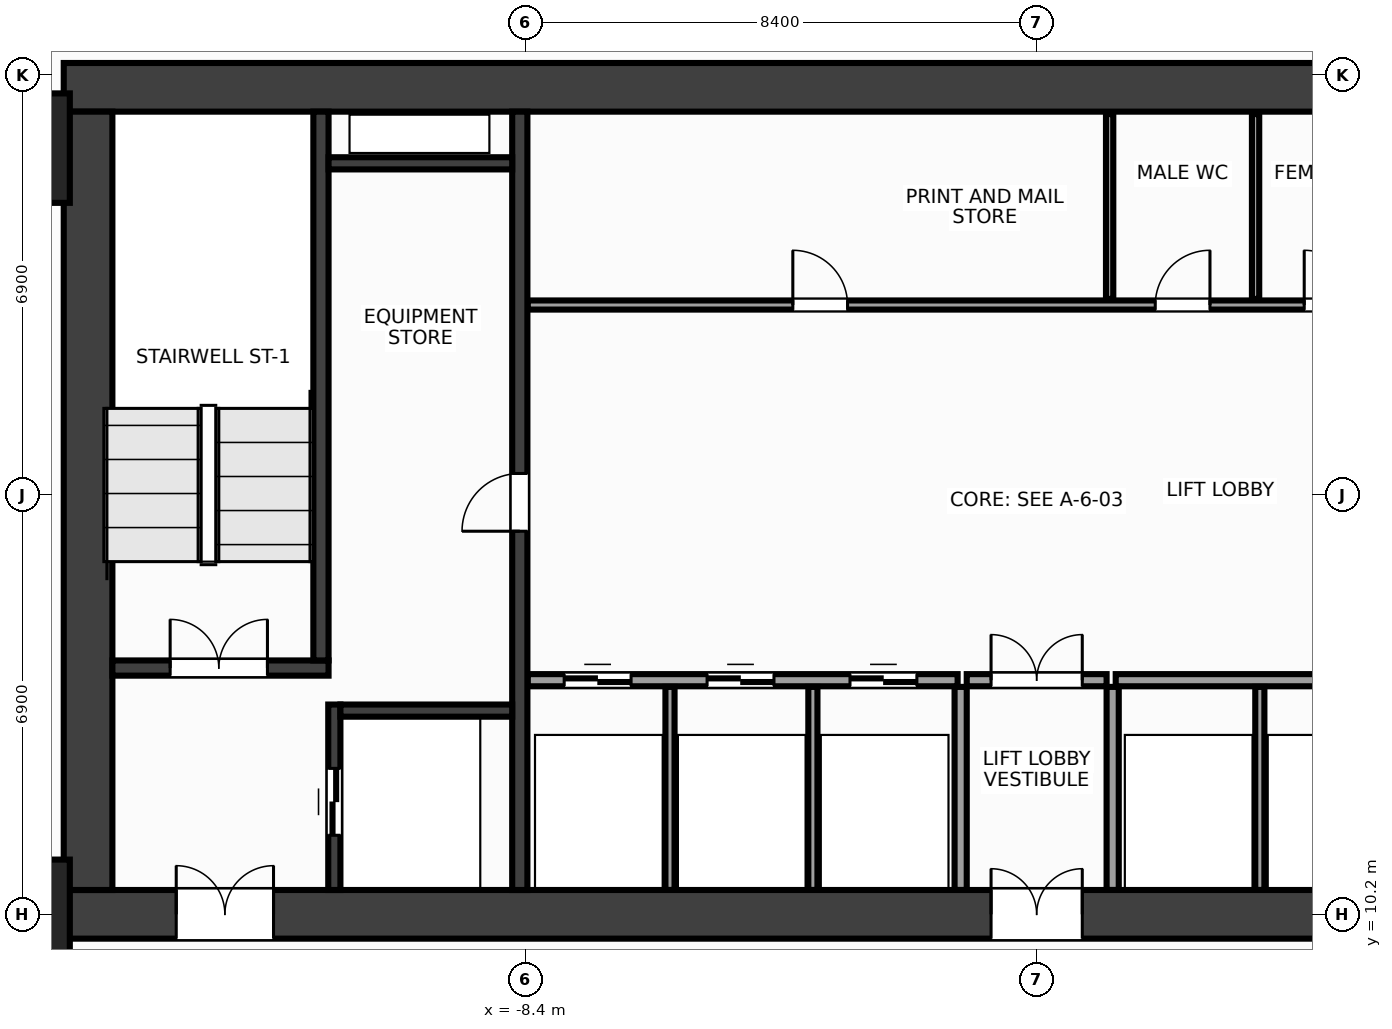
"""IFC4 building model, lengths in metres.
Left out: names, types, materials, properties, quantities, classifications, styles, units other than length and angle.
Written with IfcOpenShell. Run it as: python <this file> out.ifc"""

import sys

from ifc_helpers import new_model, si_unit, direction, frame, frame_2d, origin, origin_2d, place, context, subcontext, project, spatial, rectangle, extrude, source, transform, mapped, element, fill, save


model = new_model("IFC4")
c1 = context("Model", 3, precision=1e-05, world=origin(), true_north=direction((0.0, 1.0)))
c2 = subcontext(c1, "Body", "Model", "MODEL_VIEW")
j1 = project(units=[si_unit("LENGTHUNIT", "METRE"), si_unit("PLANEANGLEUNIT", "RADIAN")], contexts=[c1])
p1 = place(None, origin())
s1 = spatial("IfcSite", under=j1, at=p1, CompositionType="ELEMENT")
p2 = place(p1, origin())
s2 = spatial("IfcBuilding", under=s1, at=p2, CompositionType="ELEMENT")
p3 = place(p2, frame((0.0, 0.0, 52.4)))
s3 = spatial("IfcBuildingStorey", under=s2, at=p3, CompositionType="ELEMENT", Elevation=52.4)
m1 = source(origin(), c2, "Body", "SweptSolid", [
    extrude(rectangle(XDim=32.0, YDim=0.8, at=frame_2d((16.0, 0.0))), origin(), (0.0, 0.0, 1.0), 3.6),
])
p4 = place(p3, frame((-16.0, 23.8, 0.0), z_axis=(0.0, 0.0, 1.0), x_axis=(1.0, 0.0, 0.0)))
e1 = element("IfcWall", 1, at=p4, inside=s3, PredefinedType="SHEAR", context=c2, shape_type="MappedRepresentation", body=[
    mapped(m1, transform((0.0, 0.0, 0.0), x_axis=(1.0, 0.0, 0.0), y_axis=(0.0, 1.0, 0.0), z_axis=(0.0, 0.0, 1.0), scale=1.0)),
])
p5 = place(p3, frame((-16.0, 10.2, 0.0), z_axis=(0.0, 0.0, 1.0), x_axis=(1.0, 0.0, 0.0)))
e2 = element("IfcWall", 2, at=p5, inside=s3, PredefinedType="SHEAR", context=c2, shape_type="MappedRepresentation", body=[
    mapped(m1, transform((0.0, 0.0, 0.0), x_axis=(1.0, 0.0, 0.0), y_axis=(0.0, 1.0, 0.0), z_axis=(0.0, 0.0, 1.0), scale=1.0)),
])
p6 = place(p5, frame((1.85, 0.0, 0.0)))
e3 = element("IfcOpeningElement", 3, at=p6, cuts=e2, PredefinedType="OPENING", context=c2, shape_type="SweptSolid", body=[
    extrude(rectangle(XDim=1.6, YDim=2.15, at=frame_2d((0.8, 1.075))), frame((0.0, 0.412, 0.0), z_axis=(0.0, -1.0, 0.0), x_axis=(1.0, 0.0, 0.0)), (0.0, 0.0, 1.0), 0.824),
])
p7 = place(p5, frame((28.55, 0.0, 0.0)))
e4 = element("IfcOpeningElement", 4, at=p7, cuts=e2, PredefinedType="OPENING", context=c2, shape_type="SweptSolid", body=[
    extrude(rectangle(XDim=1.6, YDim=2.15, at=frame_2d((0.8, 1.075))), frame((0.0, 0.412, 0.0), z_axis=(0.0, -1.0, 0.0), x_axis=(1.0, 0.0, 0.0)), (0.0, 0.0, 1.0), 0.824),
])
p8 = place(p5, frame((15.25, 0.0, 0.0)))
e5 = element("IfcOpeningElement", 5, at=p8, cuts=e2, PredefinedType="OPENING", context=c2, shape_type="SweptSolid", body=[
    extrude(rectangle(XDim=1.5, YDim=2.2, at=frame_2d((0.75, 1.1))), frame((0.0, 0.412, 0.0), z_axis=(0.0, -1.0, 0.0), x_axis=(1.0, 0.0, 0.0)), (0.0, 0.0, 1.0), 0.824),
])
m2 = source(origin(), c2, "Body", "SweptSolid", [
    extrude(rectangle(XDim=12.8, YDim=0.8, at=frame_2d((6.4, 0.0))), origin(), (0.0, 0.0, 1.0), 3.6),
])
p9 = place(p3, frame((-15.6, 10.6, 0.0), z_axis=(0.0, 0.0, 1.0), x_axis=(0.0, 1.0, 0.0)))
e6 = element("IfcWall", 6, at=p9, inside=s3, PredefinedType="SHEAR", context=c2, shape_type="MappedRepresentation", body=[
    mapped(m2, transform((0.0, 0.0, 0.0), x_axis=(1.0, 0.0, 0.0), y_axis=(0.0, 1.0, 0.0), z_axis=(0.0, 0.0, 1.0), scale=1.0)),
])
m3 = source(origin(), c2, "Body", "SweptSolid", [
    extrude(rectangle(XDim=12.8, YDim=0.25, at=frame_2d((6.4, 0.0))), origin(), (0.0, 0.0, 1.0), 3.6),
])
p10 = place(p3, frame((-8.5, 10.6, 0.0), z_axis=(0.0, 0.0, 1.0), x_axis=(0.0, 1.0, 0.0)))
e7 = element("IfcWall", 7, at=p10, inside=s3, PredefinedType="SHEAR", context=c2, shape_type="MappedRepresentation", body=[
    mapped(m3, transform((0.0, 0.0, 0.0), x_axis=(1.0, 0.0, 0.0), y_axis=(0.0, 1.0, 0.0), z_axis=(0.0, 0.0, 1.0), scale=1.0)),
])
p11 = place(p10, frame((5.9, 0.0, 0.0)))
e8 = element("IfcOpeningElement", 8, at=p11, cuts=e7, PredefinedType="OPENING", context=c2, shape_type="SweptSolid", body=[
    extrude(rectangle(XDim=0.95, YDim=2.15, at=frame_2d((0.475, 1.075))), frame((0.0, 0.137, 0.0), z_axis=(0.0, -1.0, 0.0), x_axis=(1.0, 0.0, 0.0)), (0.0, 0.0, 1.0), 0.274),
])
m4 = source(origin(), c2, "Body", "SweptSolid", [
    extrude(rectangle(XDim=3.555, YDim=0.25, at=frame_2d((1.777, 0.0))), origin(), (0.0, 0.0, 1.0), 3.6),
])
p12 = place(p3, frame((-15.2, 14.25, 0.0), z_axis=(0.0, 0.0, 1.0), x_axis=(1.0, 0.0, 0.0)))
e9 = element("IfcWall", 9, at=p12, inside=s3, PredefinedType="SHEAR", context=c2, shape_type="MappedRepresentation", body=[
    mapped(m4, transform((0.0, 0.0, 0.0), x_axis=(1.0, 0.0, 0.0), y_axis=(0.0, 1.0, 0.0), z_axis=(0.0, 0.0, 1.0), scale=1.0)),
])
p13 = place(p12, frame((0.95, 0.0, 0.0)))
e10 = element("IfcOpeningElement", 10, at=p13, cuts=e9, PredefinedType="OPENING", context=c2, shape_type="SweptSolid", body=[
    extrude(rectangle(XDim=1.6, YDim=2.15, at=frame_2d((0.8, 1.075))), frame((0.0, 0.137, 0.0), z_axis=(0.0, -1.0, 0.0), x_axis=(1.0, 0.0, 0.0)), (0.0, 0.0, 1.0), 0.274),
])
m5 = source(origin(), c2, "Body", "SweptSolid", [
    extrude(rectangle(XDim=9.025, YDim=0.25, at=frame_2d((4.512, 0.0))), origin(), (0.0, 0.0, 1.0), 3.6),
])
p14 = place(p3, frame((-11.77, 14.375, 0.0), z_axis=(0.0, 0.0, 1.0), x_axis=(0.0, 1.0, 0.0)))
e11 = element("IfcWall", 11, at=p14, inside=s3, PredefinedType="SHEAR", context=c2, shape_type="MappedRepresentation", body=[
    mapped(m5, transform((0.0, 0.0, 0.0), x_axis=(1.0, 0.0, 0.0), y_axis=(0.0, 1.0, 0.0), z_axis=(0.0, 0.0, 1.0), scale=1.0)),
])
m6 = source(origin(), c2, "Body", "SweptSolid", [
    extrude(rectangle(XDim=3.05, YDim=0.2, at=frame_2d((1.525, 0.0))), origin(), (0.0, 0.0, 1.0), 3.6),
])
p15 = place(p3, frame((-11.55, 10.6, 0.0), z_axis=(0.0, 0.0, 1.0), x_axis=(0.0, 1.0, 0.0)))
e12 = element("IfcWall", 12, at=p15, inside=s3, PredefinedType="SHEAR", context=c2, shape_type="MappedRepresentation", body=[
    mapped(m6, transform((0.0, 0.0, 0.0), x_axis=(1.0, 0.0, 0.0), y_axis=(0.0, 1.0, 0.0), z_axis=(0.0, 0.0, 1.0), scale=1.0)),
])
p16 = place(p15, frame((0.9, 0.0, 0.0)))
e13 = element("IfcOpeningElement", 13, at=p16, cuts=e12, PredefinedType="OPENING", context=c2, shape_type="SweptSolid", body=[
    extrude(rectangle(XDim=1.1, YDim=2.15, at=frame_2d((0.55, 1.075))), frame((0.0, 0.112, 0.0), z_axis=(0.0, -1.0, 0.0), x_axis=(1.0, 0.0, 0.0)), (0.0, 0.0, 1.0), 0.224),
])
m7 = source(origin(), c2, "Body", "SweptSolid", [
    extrude(rectangle(XDim=2.825, YDim=0.2, at=frame_2d((1.413, 0.0))), origin(), (0.0, 0.0, 1.0), 3.6),
])
p17 = place(p3, frame((-11.45, 13.55, 0.0), z_axis=(0.0, 0.0, 1.0), x_axis=(1.0, 0.0, 0.0)))
e14 = element("IfcWall", 14, at=p17, inside=s3, PredefinedType="SHEAR", context=c2, shape_type="MappedRepresentation", body=[
    mapped(m7, transform((0.0, 0.0, 0.0), x_axis=(1.0, 0.0, 0.0), y_axis=(0.0, 1.0, 0.0), z_axis=(0.0, 0.0, 1.0), scale=1.0)),
])
m8 = source(origin(), c2, "Body", "SweptSolid", [
    extrude(rectangle(XDim=3.02, YDim=0.2, at=frame_2d((1.51, 0.0))), origin(), (0.0, 0.0, 1.0), 3.6),
])
p18 = place(p3, frame((-11.645, 22.55, 0.0), z_axis=(0.0, 0.0, 1.0), x_axis=(1.0, 0.0, 0.0)))
e15 = element("IfcWall", 15, at=p18, inside=s3, PredefinedType="SHEAR", context=c2, shape_type="MappedRepresentation", body=[
    mapped(m8, transform((0.0, 0.0, 0.0), x_axis=(1.0, 0.0, 0.0), y_axis=(0.0, 1.0, 0.0), z_axis=(0.0, 0.0, 1.0), scale=1.0)),
])
m9 = source(origin(), c2, "Body", "SweptSolid", [
    extrude(rectangle(XDim=1.8, YDim=1.8, at=origin_2d()), origin(), (0.0, 0.0, 1.0), 3.6),
])
for number, where, z_axis, x_axis in (
    (16, (-16.8, 10.2, 0.0), (0.0, 0.0, 1.0), (1.0, 0.0, 0.0)),
    (17, (-16.8, 22.8, 0.0), (0.0, 0.0, 1.0), (1.0, 0.0, 0.0)),
):
    element("IfcColumn", number, at=place(p3, frame(where, z_axis=z_axis, x_axis=x_axis)), inside=s3, PredefinedType="COLUMN", context=c2, shape_type="MappedRepresentation", body=[
        mapped(m9, transform((0.0, 0.0, 0.0), x_axis=(1.0, 0.0, 0.0), y_axis=(0.0, 1.0, 0.0), z_axis=(0.0, 0.0, 1.0), scale=1.0)),
    ])
m10 = source(origin(), c2, "Body", "SweptSolid", [
    extrude(rectangle(XDim=7.07, YDim=0.2, at=frame_2d((3.535, 0.0))), origin(), (0.0, 0.0, 1.0), 3.36),
])
p19 = place(p3, frame((-8.37, 14.05, 0.0), z_axis=(0.0, 0.0, 1.0), x_axis=(1.0, 0.0, 0.0)))
e18 = element("IfcWall", 18, at=p19, inside=s3, PredefinedType="PARTITIONING", context=c2, shape_type="MappedRepresentation", body=[
    mapped(m10, transform((0.0, 0.0, 0.0), x_axis=(1.0, 0.0, 0.0), y_axis=(0.0, 1.0, 0.0), z_axis=(0.0, 0.0, 1.0), scale=1.0)),
])
p20 = place(p19, frame((0.6, 0.0, 0.0)))
e19 = element("IfcOpeningElement", 19, at=p20, cuts=e18, PredefinedType="OPENING", context=c2, shape_type="SweptSolid", body=[
    extrude(rectangle(XDim=1.1, YDim=2.15, at=frame_2d((0.55, 1.075))), frame((0.0, 0.112, 0.0), z_axis=(0.0, -1.0, 0.0), x_axis=(1.0, 0.0, 0.0)), (0.0, 0.0, 1.0), 0.224),
])
p21 = place(p19, frame((2.95, 0.0, 0.0)))
e20 = element("IfcOpeningElement", 20, at=p21, cuts=e18, PredefinedType="OPENING", context=c2, shape_type="SweptSolid", body=[
    extrude(rectangle(XDim=1.1, YDim=2.15, at=frame_2d((0.55, 1.075))), frame((0.0, 0.112, 0.0), z_axis=(0.0, -1.0, 0.0), x_axis=(1.0, 0.0, 0.0)), (0.0, 0.0, 1.0), 0.224),
])
p22 = place(p19, frame((5.3, 0.0, 0.0)))
e21 = element("IfcOpeningElement", 21, at=p22, cuts=e18, PredefinedType="OPENING", context=c2, shape_type="SweptSolid", body=[
    extrude(rectangle(XDim=1.1, YDim=2.15, at=frame_2d((0.55, 1.075))), frame((0.0, 0.112, 0.0), z_axis=(0.0, -1.0, 0.0), x_axis=(1.0, 0.0, 0.0)), (0.0, 0.0, 1.0), 0.224),
])
p23 = place(p3, frame((1.3, 14.05, 0.0), z_axis=(0.0, 0.0, 1.0), x_axis=(1.0, 0.0, 0.0)))
e22 = element("IfcWall", 22, at=p23, inside=s3, PredefinedType="PARTITIONING", context=c2, shape_type="MappedRepresentation", body=[
    mapped(m10, transform((0.0, 0.0, 0.0), x_axis=(1.0, 0.0, 0.0), y_axis=(0.0, 1.0, 0.0), z_axis=(0.0, 0.0, 1.0), scale=1.0)),
])
m11 = source(origin(), c2, "Body", "SweptSolid", [
    extrude(rectangle(XDim=3.34, YDim=0.2, at=frame_2d((1.67, 0.0))), origin(), (0.0, 0.0, 1.0), 3.36),
])
for number, where, z_axis, x_axis in (
    (23, (-1.25, 10.6, 0.0), (0.0, 0.0, 1.0), (0.0, 1.0, 0.0)),
    (24, (1.25, 10.6, 0.0), (0.0, 0.0, 1.0), (0.0, 1.0, 0.0)),
):
    element("IfcWall", number, at=place(p3, frame(where, z_axis=z_axis, x_axis=x_axis)), inside=s3, PredefinedType="PARTITIONING", context=c2, shape_type="MappedRepresentation", body=[
        mapped(m11, transform((0.0, 0.0, 0.0), x_axis=(1.0, 0.0, 0.0), y_axis=(0.0, 1.0, 0.0), z_axis=(0.0, 0.0, 1.0), scale=1.0)),
    ])
m12 = source(origin(), c2, "Body", "SweptSolid", [
    extrude(rectangle(XDim=2.3, YDim=0.2, at=frame_2d((1.15, 0.0))), origin(), (0.0, 0.0, 1.0), 3.36),
])
p24 = place(p3, frame((-1.15, 14.05, 0.0), z_axis=(0.0, 0.0, 1.0), x_axis=(1.0, 0.0, 0.0)))
e25 = element("IfcWall", 25, at=p24, inside=s3, PredefinedType="PARTITIONING", context=c2, shape_type="MappedRepresentation", body=[
    mapped(m12, transform((0.0, 0.0, 0.0), x_axis=(1.0, 0.0, 0.0), y_axis=(0.0, 1.0, 0.0), z_axis=(0.0, 0.0, 1.0), scale=1.0)),
])
p25 = place(p24, frame((0.4, 0.0, 0.0)))
e26 = element("IfcOpeningElement", 26, at=p25, cuts=e25, PredefinedType="OPENING", context=c2, shape_type="SweptSolid", body=[
    extrude(rectangle(XDim=1.5, YDim=2.2, at=frame_2d((0.75, 1.1))), frame((0.0, 0.112, 0.0), z_axis=(0.0, -1.0, 0.0), x_axis=(1.0, 0.0, 0.0)), (0.0, 0.0, 1.0), 0.224),
])
m13 = source(origin(), c2, "Body", "SweptSolid", [
    extrude(rectangle(XDim=14.59, YDim=0.15, at=frame_2d((7.295, 0.0))), origin(), (0.0, 0.0, 1.0), 3.36),
])
p26 = place(p3, frame((-8.37, 20.22, 0.0), z_axis=(0.0, 0.0, 1.0), x_axis=(1.0, 0.0, 0.0)))
e27 = element("IfcWall", 27, at=p26, inside=s3, PredefinedType="PARTITIONING", context=c2, shape_type="MappedRepresentation", body=[
    mapped(m13, transform((0.0, 0.0, 0.0), x_axis=(1.0, 0.0, 0.0), y_axis=(0.0, 1.0, 0.0), z_axis=(0.0, 0.0, 1.0), scale=1.0)),
])
p27 = place(p26, frame((4.36, 0.0, 0.0)))
e28 = element("IfcOpeningElement", 28, at=p27, cuts=e27, PredefinedType="OPENING", context=c2, shape_type="SweptSolid", body=[
    extrude(rectangle(XDim=0.9, YDim=2.15, at=frame_2d((0.45, 1.075))), frame((0.0, 0.087, 0.0), z_axis=(0.0, -1.0, 0.0), x_axis=(1.0, 0.0, 0.0)), (0.0, 0.0, 1.0), 0.174),
])
p28 = place(p26, frame((10.32, 0.0, 0.0)))
e29 = element("IfcOpeningElement", 29, at=p28, cuts=e27, PredefinedType="OPENING", context=c2, shape_type="SweptSolid", body=[
    extrude(rectangle(XDim=0.9, YDim=2.15, at=frame_2d((0.45, 1.075))), frame((0.0, 0.087, 0.0), z_axis=(0.0, -1.0, 0.0), x_axis=(1.0, 0.0, 0.0)), (0.0, 0.0, 1.0), 0.174),
])
p29 = place(p26, frame((12.77, 0.0, 0.0)))
e30 = element("IfcOpeningElement", 30, at=p29, cuts=e27, PredefinedType="OPENING", context=c2, shape_type="SweptSolid", body=[
    extrude(rectangle(XDim=0.9, YDim=2.15, at=frame_2d((0.45, 1.075))), frame((0.0, 0.087, 0.0), z_axis=(0.0, -1.0, 0.0), x_axis=(1.0, 0.0, 0.0)), (0.0, 0.0, 1.0), 0.174),
])
m14 = source(origin(), c2, "Body", "SweptSolid", [
    extrude(rectangle(XDim=3.34, YDim=0.15, at=frame_2d((1.67, 0.0))), origin(), (0.0, 0.0, 1.0), 3.36),
])
for number, where, z_axis, x_axis in (
    (31, (-6.03, 10.6, 0.0), (0.0, 0.0, 1.0), (0.0, 1.0, 0.0)),
    (32, (-3.68, 10.6, 0.0), (0.0, 0.0, 1.0), (0.0, 1.0, 0.0)),
    (33, (3.67, 10.6, 0.0), (0.0, 0.0, 1.0), (0.0, 1.0, 0.0)),
):
    element("IfcWall", number, at=place(p3, frame(where, z_axis=z_axis, x_axis=x_axis)), inside=s3, PredefinedType="PARTITIONING", context=c2, shape_type="MappedRepresentation", body=[
        mapped(m14, transform((0.0, 0.0, 0.0), x_axis=(1.0, 0.0, 0.0), y_axis=(0.0, 1.0, 0.0), z_axis=(0.0, 0.0, 1.0), scale=1.0)),
    ])
m15 = source(origin(), c2, "Body", "SweptSolid", [
    extrude(rectangle(XDim=3.04, YDim=0.12, at=frame_2d((1.52, 0.0))), origin(), (0.0, 0.0, 1.0), 3.36),
])
for number, where, z_axis, x_axis in (
    (34, (1.2, 20.32, 0.0), (0.0, 0.0, 1.0), (0.0, 1.0, 0.0)),
    (35, (3.6, 20.32, 0.0), (0.0, 0.0, 1.0), (0.0, 1.0, 0.0)),
):
    element("IfcWall", number, at=place(p3, frame(where, z_axis=z_axis, x_axis=x_axis)), inside=s3, PredefinedType="PARTITIONING", context=c2, shape_type="MappedRepresentation", body=[
        mapped(m15, transform((0.0, 0.0, 0.0), x_axis=(1.0, 0.0, 0.0), y_axis=(0.0, 1.0, 0.0), z_axis=(0.0, 0.0, 1.0), scale=1.0)),
    ])
m16 = source(origin(), c2, "Body", "SweptSolid", [
    extrude(rectangle(XDim=1.6, YDim=2.15, at=frame_2d((0.8, 1.075))), frame((0.0, 0.025, 0.0), z_axis=(0.0, -1.0, 0.0), x_axis=(1.0, 0.0, 0.0)), (0.0, 0.0, 1.0), 0.05),
])
p30 = place(p13, origin())
e36 = element("IfcDoor", 36, at=p30, inside=s3, OperationType="DOUBLE_DOOR_SINGLE_SWING", PredefinedType="DOOR", context=c2, shape_type="MappedRepresentation", body=[
    mapped(m16, transform((0.0, 0.0, 0.0), x_axis=(1.0, 0.0, 0.0), y_axis=(0.0, 1.0, 0.0), z_axis=(0.0, 0.0, 1.0), scale=1.0)),
])
fill(e10, e36)
p31 = place(p6, origin())
e37 = element("IfcDoor", 37, at=p31, inside=s3, OperationType="DOUBLE_DOOR_SINGLE_SWING", PredefinedType="DOOR", context=c2, shape_type="MappedRepresentation", body=[
    mapped(m16, transform((0.0, 0.0, 0.0), x_axis=(1.0, 0.0, 0.0), y_axis=(0.0, 1.0, 0.0), z_axis=(0.0, 0.0, 1.0), scale=1.0)),
])
fill(e3, e37)
m17 = source(origin(), c2, "Body", "SweptSolid", [
    extrude(rectangle(XDim=1.1, YDim=2.15, at=frame_2d((0.55, 1.075))), frame((0.0, 0.025, 0.0), z_axis=(0.0, -1.0, 0.0), x_axis=(1.0, 0.0, 0.0)), (0.0, 0.0, 1.0), 0.05),
])
p32 = place(p16, origin())
e38 = element("IfcDoor", 38, at=p32, inside=s3, OperationType="DOUBLE_DOOR_SLIDING", PredefinedType="DOOR", context=c2, shape_type="MappedRepresentation", body=[
    mapped(m17, transform((0.0, 0.0, 0.0), x_axis=(1.0, 0.0, 0.0), y_axis=(0.0, 1.0, 0.0), z_axis=(0.0, 0.0, 1.0), scale=1.0)),
])
fill(e13, e38)
m18 = source(origin(), c2, "Body", "SweptSolid", [
    extrude(rectangle(XDim=0.95, YDim=2.15, at=frame_2d((0.475, 1.075))), frame((0.0, 0.025, 0.0), z_axis=(0.0, -1.0, 0.0), x_axis=(1.0, 0.0, 0.0)), (0.0, 0.0, 1.0), 0.05),
])
p33 = place(p11, origin())
e39 = element("IfcDoor", 39, at=p33, inside=s3, OperationType="SINGLE_SWING_LEFT", PredefinedType="DOOR", context=c2, shape_type="MappedRepresentation", body=[
    mapped(m18, transform((0.0, 0.0, 0.0), x_axis=(1.0, 0.0, 0.0), y_axis=(0.0, 1.0, 0.0), z_axis=(0.0, 0.0, 1.0), scale=1.0)),
])
fill(e8, e39)
p34 = place(p20, origin())
e40 = element("IfcDoor", 40, at=p34, inside=s3, OperationType="DOUBLE_DOOR_SLIDING", PredefinedType="DOOR", context=c2, shape_type="MappedRepresentation", body=[
    mapped(m17, transform((0.0, 0.0, 0.0), x_axis=(1.0, 0.0, 0.0), y_axis=(0.0, 1.0, 0.0), z_axis=(0.0, 0.0, 1.0), scale=1.0)),
])
fill(e19, e40)
p35 = place(p21, origin())
e41 = element("IfcDoor", 41, at=p35, inside=s3, OperationType="DOUBLE_DOOR_SLIDING", PredefinedType="DOOR", context=c2, shape_type="MappedRepresentation", body=[
    mapped(m17, transform((0.0, 0.0, 0.0), x_axis=(1.0, 0.0, 0.0), y_axis=(0.0, 1.0, 0.0), z_axis=(0.0, 0.0, 1.0), scale=1.0)),
])
fill(e20, e41)
p36 = place(p22, origin())
e42 = element("IfcDoor", 42, at=p36, inside=s3, OperationType="DOUBLE_DOOR_SLIDING", PredefinedType="DOOR", context=c2, shape_type="MappedRepresentation", body=[
    mapped(m17, transform((0.0, 0.0, 0.0), x_axis=(1.0, 0.0, 0.0), y_axis=(0.0, 1.0, 0.0), z_axis=(0.0, 0.0, 1.0), scale=1.0)),
])
fill(e21, e42)
m19 = source(origin(), c2, "Body", "SweptSolid", [
    extrude(rectangle(XDim=1.5, YDim=2.2, at=frame_2d((0.75, 1.1))), frame((0.0, 0.025, 0.0), z_axis=(0.0, -1.0, 0.0), x_axis=(1.0, 0.0, 0.0)), (0.0, 0.0, 1.0), 0.05),
])
p37 = place(p25, origin())
e43 = element("IfcDoor", 43, at=p37, inside=s3, OperationType="DOUBLE_DOOR_SINGLE_SWING", PredefinedType="DOOR", context=c2, shape_type="MappedRepresentation", body=[
    mapped(m19, transform((0.0, 0.0, 0.0), x_axis=(1.0, 0.0, 0.0), y_axis=(0.0, 1.0, 0.0), z_axis=(0.0, 0.0, 1.0), scale=1.0)),
])
fill(e26, e43)
p38 = place(p8, origin())
e44 = element("IfcDoor", 44, at=p38, inside=s3, OperationType="DOUBLE_DOOR_SINGLE_SWING", PredefinedType="DOOR", context=c2, shape_type="MappedRepresentation", body=[
    mapped(m19, transform((0.0, 0.0, 0.0), x_axis=(1.0, 0.0, 0.0), y_axis=(0.0, 1.0, 0.0), z_axis=(0.0, 0.0, 1.0), scale=1.0)),
])
fill(e5, e44)
m20 = source(origin(), c2, "Body", "SweptSolid", [
    extrude(rectangle(XDim=0.9, YDim=2.15, at=frame_2d((0.45, 1.075))), frame((0.0, 0.025, 0.0), z_axis=(0.0, -1.0, 0.0), x_axis=(1.0, 0.0, 0.0)), (0.0, 0.0, 1.0), 0.05),
])
p39 = place(p27, origin())
e45 = element("IfcDoor", 45, at=p39, inside=s3, OperationType="SINGLE_SWING_LEFT", PredefinedType="DOOR", context=c2, shape_type="MappedRepresentation", body=[
    mapped(m20, transform((0.0, 0.0, 0.0), x_axis=(1.0, 0.0, 0.0), y_axis=(0.0, 1.0, 0.0), z_axis=(0.0, 0.0, 1.0), scale=1.0)),
])
fill(e28, e45)
p40 = place(p28, origin())
e46 = element("IfcDoor", 46, at=p40, inside=s3, OperationType="SINGLE_SWING_RIGHT", PredefinedType="DOOR", context=c2, shape_type="MappedRepresentation", body=[
    mapped(m20, transform((0.0, 0.0, 0.0), x_axis=(1.0, 0.0, 0.0), y_axis=(0.0, 1.0, 0.0), z_axis=(0.0, 0.0, 1.0), scale=1.0)),
])
fill(e29, e46)
p41 = place(p29, origin())
e47 = element("IfcDoor", 47, at=p41, inside=s3, OperationType="SINGLE_SWING_LEFT", PredefinedType="DOOR", context=c2, shape_type="MappedRepresentation", body=[
    mapped(m20, transform((0.0, 0.0, 0.0), x_axis=(1.0, 0.0, 0.0), y_axis=(0.0, 1.0, 0.0), z_axis=(0.0, 0.0, 1.0), scale=1.0)),
])
fill(e30, e47)
save(model, sys.argv[1])
